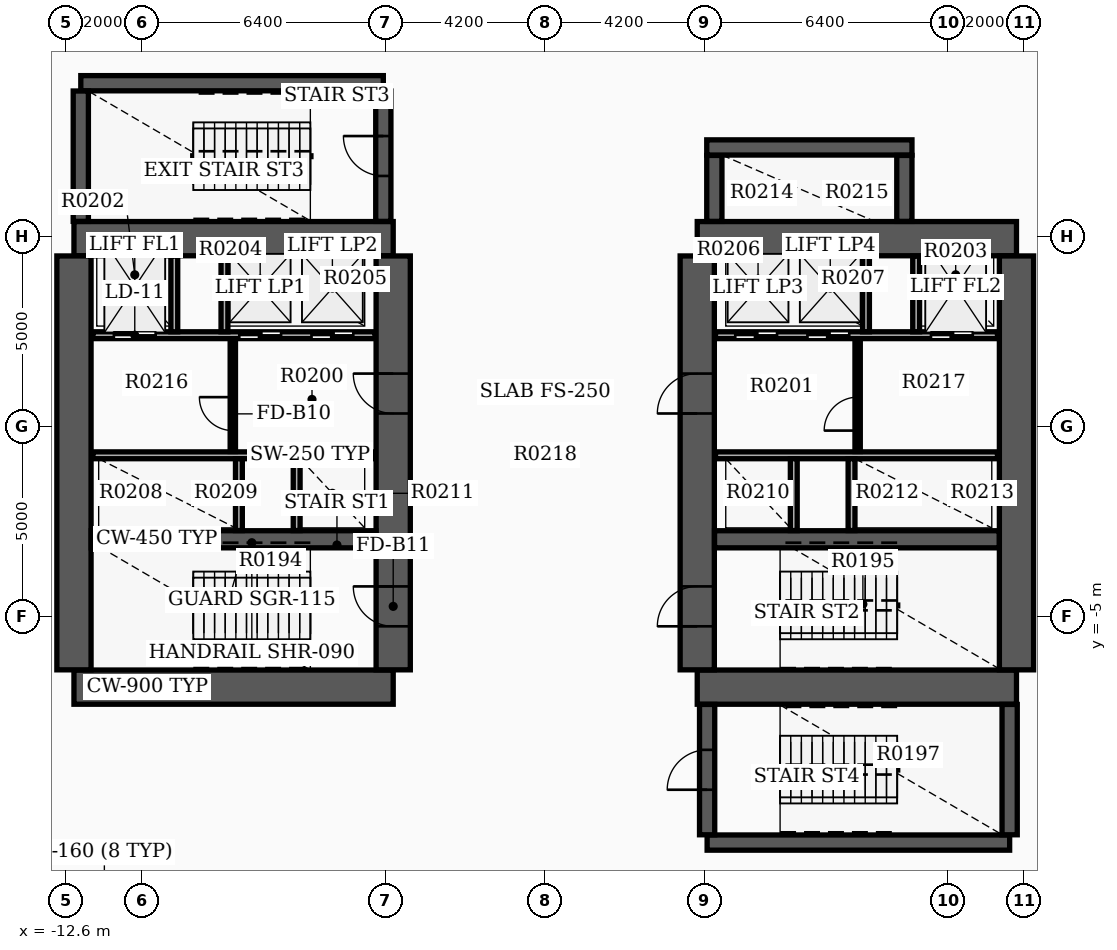
"""IFC4 building model, lengths in metres.
Left out: names, types, materials, properties, quantities, classifications, styles, units other than length and angle.
Written with IfcOpenShell. Run it as: python <this file> out.ifc"""

import sys

from ifc_helpers import new_model, si_unit, direction, frame, frame_2d, origin, place, context, subcontext, project, spatial, rectangle, extrude, element, fill, save


model = new_model("IFC4")
c1 = context("Model", 3, precision=1e-05, world=origin(), true_north=direction((0.0, 1.0)))
c2 = subcontext(c1, "Body", "Model", "MODEL_VIEW")
j1 = project(units=[si_unit("LENGTHUNIT", "METRE"), si_unit("PLANEANGLEUNIT", "RADIAN")], contexts=[c1])
p1 = place(None, origin())
s1 = spatial("IfcSite", under=j1, at=p1, CompositionType="ELEMENT")
p2 = place(p1, origin())
s2 = spatial("IfcBuilding", under=s1, at=p2, CompositionType="ELEMENT")
p3 = place(p2, frame((0.0, 0.0, 14.7)))
s3 = spatial("IfcBuildingStorey", under=s2, at=p3, CompositionType="ELEMENT", Elevation=14.7)
for number, where, z_axis, x_axis in (
    (1, (-12.4, -6.85, 0.0), (0.0, 0.0, 1.0), (1.0, 0.0, 0.0)),
    (2, (-12.4, 4.95, 0.0), (0.0, 0.0, 1.0), (1.0, 0.0, 0.0)),
):
    element("IfcWall", number, at=place(p3, frame(where, z_axis=z_axis, x_axis=x_axis)), inside=s3, PredefinedType="SHEAR", context=c2, shape_type="SweptSolid", body=[
        extrude(rectangle(XDim=8.4, YDim=0.9, at=frame_2d((4.2, 0.0))), origin(), (0.0, 0.0, 1.0), 4.25),
    ])
p4 = place(p3, frame((-12.4, -6.395, 0.0), z_axis=(0.0, 0.0, 1.0), x_axis=(0.0, 1.0, 0.0)))
e3 = element("IfcWall", 3, at=p4, inside=s3, PredefinedType="SHEAR", context=c2, shape_type="SweptSolid", body=[
    extrude(rectangle(XDim=10.89, YDim=0.9, at=frame_2d((5.445, 0.0))), origin(), (0.0, 0.0, 1.0), 4.25),
])
p5 = place(p3, frame((-4.0, -6.395, 0.0), z_axis=(0.0, 0.0, 1.0), x_axis=(0.0, 1.0, 0.0)))
e4 = element("IfcWall", 4, at=p5, inside=s3, PredefinedType="SHEAR", context=c2, shape_type="SweptSolid", body=[
    extrude(rectangle(XDim=10.89, YDim=0.9, at=frame_2d((5.445, 0.0))), origin(), (0.0, 0.0, 1.0), 4.25),
])
p6 = place(p5, frame((1.145, 0.0, 0.0)))
e5 = element("IfcOpeningElement", 5, at=p6, cuts=e4, PredefinedType="OPENING", context=c2, shape_type="SweptSolid", body=[
    extrude(rectangle(XDim=1.05, YDim=2.15, at=frame_2d((0.525, 1.075))), frame((0.0, 0.46, 0.0), z_axis=(0.0, -1.0, 0.0), x_axis=(1.0, 0.0, 0.0)), (0.0, 0.0, 1.0), 0.92),
])
p7 = place(p5, frame((6.745, 0.0, 0.0)))
e6 = element("IfcOpeningElement", 6, at=p7, cuts=e4, PredefinedType="OPENING", context=c2, shape_type="SweptSolid", body=[
    extrude(rectangle(XDim=1.05, YDim=2.15, at=frame_2d((0.525, 1.075))), frame((0.0, 0.46, 0.0), z_axis=(0.0, -1.0, 0.0), x_axis=(1.0, 0.0, 0.0)), (0.0, 0.0, 1.0), 0.92),
])
p8 = place(p3, frame((-11.945, -2.96, 0.0), z_axis=(0.0, 0.0, 1.0), x_axis=(1.0, 0.0, 0.0)))
e7 = element("IfcWall", 7, at=p8, inside=s3, PredefinedType="SHEAR", context=c2, shape_type="SweptSolid", body=[
    extrude(rectangle(XDim=7.49, YDim=0.45, at=frame_2d((3.745, 0.0))), origin(), (0.0, 0.0, 1.0), 4.25),
])
for number, where, z_axis, x_axis in (
    (8, (4.0, -6.85, 0.0), (0.0, 0.0, 1.0), (1.0, 0.0, 0.0)),
    (9, (4.0, 4.95, 0.0), (0.0, 0.0, 1.0), (1.0, 0.0, 0.0)),
):
    element("IfcWall", number, at=place(p3, frame(where, z_axis=z_axis, x_axis=x_axis)), inside=s3, PredefinedType="SHEAR", context=c2, shape_type="SweptSolid", body=[
        extrude(rectangle(XDim=8.4, YDim=0.9, at=frame_2d((4.2, 0.0))), origin(), (0.0, 0.0, 1.0), 4.25),
    ])
p9 = place(p3, frame((4.0, -6.395, 0.0), z_axis=(0.0, 0.0, 1.0), x_axis=(0.0, 1.0, 0.0)))
e10 = element("IfcWall", 10, at=p9, inside=s3, PredefinedType="SHEAR", context=c2, shape_type="SweptSolid", body=[
    extrude(rectangle(XDim=10.89, YDim=0.9, at=frame_2d((5.445, 0.0))), origin(), (0.0, 0.0, 1.0), 4.25),
])
p10 = place(p9, frame((1.145, 0.0, 0.0)))
e11 = element("IfcOpeningElement", 11, at=p10, cuts=e10, PredefinedType="OPENING", context=c2, shape_type="SweptSolid", body=[
    extrude(rectangle(XDim=1.05, YDim=2.15, at=frame_2d((0.525, 1.075))), frame((0.0, 0.46, 0.0), z_axis=(0.0, -1.0, 0.0), x_axis=(1.0, 0.0, 0.0)), (0.0, 0.0, 1.0), 0.92),
])
p11 = place(p9, frame((6.745, 0.0, 0.0)))
e12 = element("IfcOpeningElement", 12, at=p11, cuts=e10, PredefinedType="OPENING", context=c2, shape_type="SweptSolid", body=[
    extrude(rectangle(XDim=1.05, YDim=2.15, at=frame_2d((0.525, 1.075))), frame((0.0, 0.46, 0.0), z_axis=(0.0, -1.0, 0.0), x_axis=(1.0, 0.0, 0.0)), (0.0, 0.0, 1.0), 0.92),
])
p12 = place(p3, frame((12.4, -6.395, 0.0), z_axis=(0.0, 0.0, 1.0), x_axis=(0.0, 1.0, 0.0)))
e13 = element("IfcWall", 13, at=p12, inside=s3, PredefinedType="SHEAR", context=c2, shape_type="SweptSolid", body=[
    extrude(rectangle(XDim=10.89, YDim=0.9, at=frame_2d((5.445, 0.0))), origin(), (0.0, 0.0, 1.0), 4.25),
])
p13 = place(p3, frame((4.455, -2.96, 0.0), z_axis=(0.0, 0.0, 1.0), x_axis=(1.0, 0.0, 0.0)))
e14 = element("IfcWall", 14, at=p13, inside=s3, PredefinedType="SHEAR", context=c2, shape_type="SweptSolid", body=[
    extrude(rectangle(XDim=7.49, YDim=0.45, at=frame_2d((3.745, 0.0))), origin(), (0.0, 0.0, 1.0), 4.25),
])
p14 = place(p3, frame((-12.22, 9.04, 0.0), z_axis=(0.0, 0.0, 1.0), x_axis=(1.0, 0.0, 0.0)))
e15 = element("IfcWall", 15, at=p14, inside=s3, PredefinedType="SHEAR", context=c2, shape_type="SweptSolid", body=[
    extrude(rectangle(XDim=7.96, YDim=0.4, at=frame_2d((3.98, 0.0))), origin(), (0.0, 0.0, 1.0), 4.25),
])
p15 = place(p3, frame((-12.22, 5.405, 0.0), z_axis=(0.0, 0.0, 1.0), x_axis=(0.0, 1.0, 0.0)))
e16 = element("IfcWall", 16, at=p15, inside=s3, PredefinedType="SHEAR", context=c2, shape_type="SweptSolid", body=[
    extrude(rectangle(XDim=3.43, YDim=0.4, at=frame_2d((1.715, 0.0))), origin(), (0.0, 0.0, 1.0), 4.25),
])
p16 = place(p3, frame((-4.26, 5.405, 0.0), z_axis=(0.0, 0.0, 1.0), x_axis=(0.0, 1.0, 0.0)))
e17 = element("IfcWall", 17, at=p16, inside=s3, PredefinedType="SHEAR", context=c2, shape_type="SweptSolid", body=[
    extrude(rectangle(XDim=3.43, YDim=0.4, at=frame_2d((1.715, 0.0))), origin(), (0.0, 0.0, 1.0), 4.25),
])
p17 = place(p16, frame((1.195, 0.0, 0.0)))
e18 = element("IfcOpeningElement", 18, at=p17, cuts=e17, PredefinedType="OPENING", context=c2, shape_type="SweptSolid", body=[
    extrude(rectangle(XDim=1.05, YDim=2.15, at=frame_2d((0.525, 1.075))), frame((0.0, 0.21, 0.0), z_axis=(0.0, -1.0, 0.0), x_axis=(1.0, 0.0, 0.0)), (0.0, 0.0, 1.0), 0.42),
])
p18 = place(p3, frame((4.26, -10.94, 0.0), z_axis=(0.0, 0.0, 1.0), x_axis=(1.0, 0.0, 0.0)))
e19 = element("IfcWall", 19, at=p18, inside=s3, PredefinedType="SHEAR", context=c2, shape_type="SweptSolid", body=[
    extrude(rectangle(XDim=7.96, YDim=0.4, at=frame_2d((3.98, 0.0))), origin(), (0.0, 0.0, 1.0), 4.25),
])
p19 = place(p3, frame((4.26, -10.735, 0.0), z_axis=(0.0, 0.0, 1.0), x_axis=(0.0, 1.0, 0.0)))
e20 = element("IfcWall", 20, at=p19, inside=s3, PredefinedType="SHEAR", context=c2, shape_type="SweptSolid", body=[
    extrude(rectangle(XDim=3.43, YDim=0.4, at=frame_2d((1.715, 0.0))), origin(), (0.0, 0.0, 1.0), 4.25),
])
p20 = place(p19, frame((1.185, 0.0, 0.0)))
e21 = element("IfcOpeningElement", 21, at=p20, cuts=e20, PredefinedType="OPENING", context=c2, shape_type="SweptSolid", body=[
    extrude(rectangle(XDim=1.05, YDim=2.15, at=frame_2d((0.525, 1.075))), frame((0.0, 0.21, 0.0), z_axis=(0.0, -1.0, 0.0), x_axis=(1.0, 0.0, 0.0)), (0.0, 0.0, 1.0), 0.42),
])
p21 = place(p3, frame((12.22, -10.735, 0.0), z_axis=(0.0, 0.0, 1.0), x_axis=(0.0, 1.0, 0.0)))
e22 = element("IfcWall", 22, at=p21, inside=s3, PredefinedType="SHEAR", context=c2, shape_type="SweptSolid", body=[
    extrude(rectangle(XDim=3.43, YDim=0.4, at=frame_2d((1.715, 0.0))), origin(), (0.0, 0.0, 1.0), 4.25),
])
p22 = place(p3, frame((4.45, 5.405, 0.0), z_axis=(0.0, 0.0, 1.0), x_axis=(0.0, 1.0, 0.0)))
e23 = element("IfcWall", 23, at=p22, inside=s3, PredefinedType="SHEAR", context=c2, shape_type="SweptSolid", body=[
    extrude(rectangle(XDim=1.735, YDim=0.4, at=frame_2d((0.867, 0.0))), origin(), (0.0, 0.0, 1.0), 4.25),
])
p23 = place(p3, frame((4.25, 7.35, 0.0), z_axis=(0.0, 0.0, 1.0), x_axis=(1.0, 0.0, 0.0)))
e24 = element("IfcWall", 24, at=p23, inside=s3, PredefinedType="SHEAR", context=c2, shape_type="SweptSolid", body=[
    extrude(rectangle(XDim=5.4, YDim=0.4, at=frame_2d((2.7, 0.0))), origin(), (0.0, 0.0, 1.0), 4.25),
])
p24 = place(p3, frame((9.45, 5.405, 0.0), z_axis=(0.0, 0.0, 1.0), x_axis=(0.0, 1.0, 0.0)))
e25 = element("IfcWall", 25, at=p24, inside=s3, PredefinedType="SHEAR", context=c2, shape_type="SweptSolid", body=[
    extrude(rectangle(XDim=1.735, YDim=0.4, at=frame_2d((0.867, 0.0))), origin(), (0.0, 0.0, 1.0), 4.25),
])
p25 = place(p3, frame((-11.9, 2.41, 0.0), z_axis=(0.0, 0.0, 1.0), x_axis=(1.0, 0.0, 0.0)))
e26 = element("IfcWall", 26, at=p25, inside=s3, PredefinedType="SOLIDWALL", context=c2, shape_type="SweptSolid", body=[
    extrude(rectangle(XDim=7.42, YDim=0.18, at=frame_2d((3.71, 0.0))), origin(), (0.0, 0.0, 1.0), 3.32),
])
p26 = place(p25, frame((0.55, 0.0, 0.0)))
e27 = element("IfcOpeningElement", 27, at=p26, cuts=e26, PredefinedType="OPENING", context=c2, shape_type="SweptSolid", body=[
    extrude(rectangle(XDim=1.1, YDim=2.15, at=frame_2d((0.55, 1.075))), frame((0.0, 0.1, 0.0), z_axis=(0.0, -1.0, 0.0), x_axis=(1.0, 0.0, 0.0)), (0.0, 0.0, 1.0), 0.2),
])
p27 = place(p25, frame((3.85, 0.0, 0.0)))
e28 = element("IfcOpeningElement", 28, at=p27, cuts=e26, PredefinedType="OPENING", context=c2, shape_type="SweptSolid", body=[
    extrude(rectangle(XDim=1.1, YDim=2.15, at=frame_2d((0.55, 1.075))), frame((0.0, 0.1, 0.0), z_axis=(0.0, -1.0, 0.0), x_axis=(1.0, 0.0, 0.0)), (0.0, 0.0, 1.0), 0.2),
])
p28 = place(p25, frame((5.75, 0.0, 0.0)))
e29 = element("IfcOpeningElement", 29, at=p28, cuts=e26, PredefinedType="OPENING", context=c2, shape_type="SweptSolid", body=[
    extrude(rectangle(XDim=1.1, YDim=2.15, at=frame_2d((0.55, 1.075))), frame((0.0, 0.1, 0.0), z_axis=(0.0, -1.0, 0.0), x_axis=(1.0, 0.0, 0.0)), (0.0, 0.0, 1.0), 0.2),
])
p29 = place(p3, frame((4.48, 2.41, 0.0), z_axis=(0.0, 0.0, 1.0), x_axis=(1.0, 0.0, 0.0)))
e30 = element("IfcWall", 30, at=p29, inside=s3, PredefinedType="SOLIDWALL", context=c2, shape_type="SweptSolid", body=[
    extrude(rectangle(XDim=7.42, YDim=0.18, at=frame_2d((3.71, 0.0))), origin(), (0.0, 0.0, 1.0), 3.32),
])
p30 = place(p29, frame((5.67, 0.0, 0.0)))
e31 = element("IfcOpeningElement", 31, at=p30, cuts=e30, PredefinedType="OPENING", context=c2, shape_type="SweptSolid", body=[
    extrude(rectangle(XDim=1.1, YDim=2.15, at=frame_2d((0.55, 1.075))), frame((0.0, 0.1, 0.0), z_axis=(0.0, -1.0, 0.0), x_axis=(1.0, 0.0, 0.0)), (0.0, 0.0, 1.0), 0.2),
])
p31 = place(p29, frame((0.52, 0.0, 0.0)))
e32 = element("IfcOpeningElement", 32, at=p31, cuts=e30, PredefinedType="OPENING", context=c2, shape_type="SweptSolid", body=[
    extrude(rectangle(XDim=1.1, YDim=2.15, at=frame_2d((0.55, 1.075))), frame((0.0, 0.1, 0.0), z_axis=(0.0, -1.0, 0.0), x_axis=(1.0, 0.0, 0.0)), (0.0, 0.0, 1.0), 0.2),
])
p32 = place(p29, frame((2.42, 0.0, 0.0)))
e33 = element("IfcOpeningElement", 33, at=p32, cuts=e30, PredefinedType="OPENING", context=c2, shape_type="SweptSolid", body=[
    extrude(rectangle(XDim=1.1, YDim=2.15, at=frame_2d((0.55, 1.075))), frame((0.0, 0.1, 0.0), z_axis=(0.0, -1.0, 0.0), x_axis=(1.0, 0.0, 0.0)), (0.0, 0.0, 1.0), 0.2),
])
for number, where, z_axis, x_axis in (
    (34, (-11.9, -0.75, 0.0), (0.0, 0.0, 1.0), (1.0, 0.0, 0.0)),
    (35, (4.48, -0.75, 0.0), (0.0, 0.0, 1.0), (1.0, 0.0, 0.0)),
):
    element("IfcWall", number, at=place(p3, frame(where, z_axis=z_axis, x_axis=x_axis)), inside=s3, PredefinedType="SOLIDWALL", context=c2, shape_type="SweptSolid", body=[
        extrude(rectangle(XDim=7.42, YDim=0.18, at=frame_2d((3.71, 0.0))), origin(), (0.0, 0.0, 1.0), 3.32),
    ])
for number, where, z_axis, x_axis in (
    (36, (-9.76, 2.5, 0.0), (0.0, 0.0, 1.0), (0.0, 1.0, 0.0)),
    (37, (-8.44, 2.5, 0.0), (0.0, 0.0, 1.0), (0.0, 1.0, 0.0)),
    (38, (8.44, 2.5, 0.0), (0.0, 0.0, 1.0), (0.0, 1.0, 0.0)),
    (39, (9.76, 2.5, 0.0), (0.0, 0.0, 1.0), (0.0, 1.0, 0.0)),
):
    element("IfcWall", number, at=place(p3, frame(where, z_axis=z_axis, x_axis=x_axis)), inside=s3, PredefinedType="SOLIDWALL", context=c2, shape_type="SweptSolid", body=[
        extrude(rectangle(XDim=1.99, YDim=0.18, at=frame_2d((0.995, 0.0))), origin(), (0.0, 0.0, 1.0), 3.32),
    ])
for number, where, z_axis, x_axis in (
    (40, (-8.06, -2.73, 0.0), (0.0, 0.0, 1.0), (0.0, 1.0, 0.0)),
    (41, (-6.54, -2.73, 0.0), (0.0, 0.0, 1.0), (0.0, 1.0, 0.0)),
    (42, (6.54, -2.73, 0.0), (0.0, 0.0, 1.0), (0.0, 1.0, 0.0)),
    (43, (8.06, -2.73, 0.0), (0.0, 0.0, 1.0), (0.0, 1.0, 0.0)),
):
    element("IfcWall", number, at=place(p3, frame(where, z_axis=z_axis, x_axis=x_axis)), inside=s3, PredefinedType="SOLIDWALL", context=c2, shape_type="SweptSolid", body=[
        extrude(rectangle(XDim=1.89, YDim=0.18, at=frame_2d((0.945, 0.0))), origin(), (0.0, 0.0, 1.0), 3.32),
    ])
p33 = place(p3, frame((-8.22, -0.65, 0.0), z_axis=(0.0, 0.0, 1.0), x_axis=(0.0, 1.0, 0.0)))
e44 = element("IfcWall", 44, at=p33, inside=s3, PredefinedType="SOLIDWALL", context=c2, shape_type="SweptSolid", body=[
    extrude(rectangle(XDim=2.96, YDim=0.14, at=frame_2d((1.48, 0.0))), origin(), (0.0, 0.0, 1.0), 3.32),
])
p34 = place(p33, frame((0.55, 0.0, 0.0)))
e45 = element("IfcOpeningElement", 45, at=p34, cuts=e44, PredefinedType="OPENING", context=c2, shape_type="SweptSolid", body=[
    extrude(rectangle(XDim=0.88, YDim=2.1, at=frame_2d((0.44, 1.05))), frame((0.0, 0.08, 0.0), z_axis=(0.0, -1.0, 0.0), x_axis=(1.0, 0.0, 0.0)), (0.0, 0.0, 1.0), 0.16),
])
p35 = place(p3, frame((8.22, -0.65, 0.0), z_axis=(0.0, 0.0, 1.0), x_axis=(0.0, 1.0, 0.0)))
e46 = element("IfcWall", 46, at=p35, inside=s3, PredefinedType="SOLIDWALL", context=c2, shape_type="SweptSolid", body=[
    extrude(rectangle(XDim=2.96, YDim=0.14, at=frame_2d((1.48, 0.0))), origin(), (0.0, 0.0, 1.0), 3.32),
])
p36 = place(p35, frame((0.55, 0.0, 0.0)))
e47 = element("IfcOpeningElement", 47, at=p36, cuts=e46, PredefinedType="OPENING", context=c2, shape_type="SweptSolid", body=[
    extrude(rectangle(XDim=0.88, YDim=2.1, at=frame_2d((0.44, 1.05))), frame((0.0, 0.08, 0.0), z_axis=(0.0, -1.0, 0.0), x_axis=(1.0, 0.0, 0.0)), (0.0, 0.0, 1.0), 0.16),
])
p37 = place(p6, origin())
e48 = element("IfcDoor", 48, at=p37, inside=s3, OperationType="SINGLE_SWING_RIGHT", PredefinedType="DOOR", context=c2, shape_type="SweptSolid", body=[
    extrude(rectangle(XDim=1.05, YDim=2.15, at=frame_2d((0.525, 1.075))), frame((0.0, 0.025, 0.0), z_axis=(0.0, -1.0, 0.0), x_axis=(1.0, 0.0, 0.0)), (0.0, 0.0, 1.0), 0.05),
])
fill(e5, e48)
p38 = place(p10, origin())
e49 = element("IfcDoor", 49, at=p38, inside=s3, OperationType="SINGLE_SWING_LEFT", PredefinedType="DOOR", context=c2, shape_type="SweptSolid", body=[
    extrude(rectangle(XDim=1.05, YDim=2.15, at=frame_2d((0.525, 1.075))), frame((0.0, 0.025, 0.0), z_axis=(0.0, -1.0, 0.0), x_axis=(1.0, 0.0, 0.0)), (0.0, 0.0, 1.0), 0.05),
])
fill(e11, e49)
p39 = place(p7, origin())
e50 = element("IfcDoor", 50, at=p39, inside=s3, OperationType="SINGLE_SWING_RIGHT", PredefinedType="DOOR", context=c2, shape_type="SweptSolid", body=[
    extrude(rectangle(XDim=1.05, YDim=2.15, at=frame_2d((0.525, 1.075))), frame((0.0, 0.025, 0.0), z_axis=(0.0, -1.0, 0.0), x_axis=(1.0, 0.0, 0.0)), (0.0, 0.0, 1.0), 0.05),
])
fill(e6, e50)
p40 = place(p11, origin())
e51 = element("IfcDoor", 51, at=p40, inside=s3, OperationType="SINGLE_SWING_LEFT", PredefinedType="DOOR", context=c2, shape_type="SweptSolid", body=[
    extrude(rectangle(XDim=1.05, YDim=2.15, at=frame_2d((0.525, 1.075))), frame((0.0, 0.025, 0.0), z_axis=(0.0, -1.0, 0.0), x_axis=(1.0, 0.0, 0.0)), (0.0, 0.0, 1.0), 0.05),
])
fill(e12, e51)
p41 = place(p17, origin())
e52 = element("IfcDoor", 52, at=p41, inside=s3, OperationType="SINGLE_SWING_RIGHT", PredefinedType="DOOR", context=c2, shape_type="SweptSolid", body=[
    extrude(rectangle(XDim=1.05, YDim=2.15, at=frame_2d((0.525, 1.075))), frame((0.0, 0.025, 0.0), z_axis=(0.0, -1.0, 0.0), x_axis=(1.0, 0.0, 0.0)), (0.0, 0.0, 1.0), 0.05),
])
fill(e18, e52)
p42 = place(p20, origin())
e53 = element("IfcDoor", 53, at=p42, inside=s3, OperationType="SINGLE_SWING_LEFT", PredefinedType="DOOR", context=c2, shape_type="SweptSolid", body=[
    extrude(rectangle(XDim=1.05, YDim=2.15, at=frame_2d((0.525, 1.075))), frame((0.0, 0.025, 0.0), z_axis=(0.0, -1.0, 0.0), x_axis=(1.0, 0.0, 0.0)), (0.0, 0.0, 1.0), 0.05),
])
fill(e21, e53)
p43 = place(p26, origin())
e54 = element("IfcDoor", 54, at=p43, inside=s3, OperationType="DOUBLE_DOOR_SLIDING", PredefinedType="DOOR", context=c2, shape_type="SweptSolid", body=[
    extrude(rectangle(XDim=1.1, YDim=2.15, at=frame_2d((0.55, 1.075))), frame((0.0, 0.025, 0.0), z_axis=(0.0, -1.0, 0.0), x_axis=(1.0, 0.0, 0.0)), (0.0, 0.0, 1.0), 0.05),
])
fill(e27, e54)
p44 = place(p30, origin())
e55 = element("IfcDoor", 55, at=p44, inside=s3, OperationType="DOUBLE_DOOR_SLIDING", PredefinedType="DOOR", context=c2, shape_type="SweptSolid", body=[
    extrude(rectangle(XDim=1.1, YDim=2.15, at=frame_2d((0.55, 1.075))), frame((0.0, 0.025, 0.0), z_axis=(0.0, -1.0, 0.0), x_axis=(1.0, 0.0, 0.0)), (0.0, 0.0, 1.0), 0.05),
])
fill(e31, e55)
p45 = place(p27, origin())
e56 = element("IfcDoor", 56, at=p45, inside=s3, OperationType="DOUBLE_DOOR_SLIDING", PredefinedType="DOOR", context=c2, shape_type="SweptSolid", body=[
    extrude(rectangle(XDim=1.1, YDim=2.15, at=frame_2d((0.55, 1.075))), frame((0.0, 0.025, 0.0), z_axis=(0.0, -1.0, 0.0), x_axis=(1.0, 0.0, 0.0)), (0.0, 0.0, 1.0), 0.05),
])
fill(e28, e56)
p46 = place(p28, origin())
e57 = element("IfcDoor", 57, at=p46, inside=s3, OperationType="DOUBLE_DOOR_SLIDING", PredefinedType="DOOR", context=c2, shape_type="SweptSolid", body=[
    extrude(rectangle(XDim=1.1, YDim=2.15, at=frame_2d((0.55, 1.075))), frame((0.0, 0.025, 0.0), z_axis=(0.0, -1.0, 0.0), x_axis=(1.0, 0.0, 0.0)), (0.0, 0.0, 1.0), 0.05),
])
fill(e29, e57)
p47 = place(p31, origin())
e58 = element("IfcDoor", 58, at=p47, inside=s3, OperationType="DOUBLE_DOOR_SLIDING", PredefinedType="DOOR", context=c2, shape_type="SweptSolid", body=[
    extrude(rectangle(XDim=1.1, YDim=2.15, at=frame_2d((0.55, 1.075))), frame((0.0, 0.025, 0.0), z_axis=(0.0, -1.0, 0.0), x_axis=(1.0, 0.0, 0.0)), (0.0, 0.0, 1.0), 0.05),
])
fill(e32, e58)
p48 = place(p32, origin())
e59 = element("IfcDoor", 59, at=p48, inside=s3, OperationType="DOUBLE_DOOR_SLIDING", PredefinedType="DOOR", context=c2, shape_type="SweptSolid", body=[
    extrude(rectangle(XDim=1.1, YDim=2.15, at=frame_2d((0.55, 1.075))), frame((0.0, 0.025, 0.0), z_axis=(0.0, -1.0, 0.0), x_axis=(1.0, 0.0, 0.0)), (0.0, 0.0, 1.0), 0.05),
])
fill(e33, e59)
p49 = place(p34, origin())
e60 = element("IfcDoor", 60, at=p49, inside=s3, OperationType="SINGLE_SWING_RIGHT", PredefinedType="DOOR", context=c2, shape_type="SweptSolid", body=[
    extrude(rectangle(XDim=0.88, YDim=2.1, at=frame_2d((0.44, 1.05))), frame((0.0, 0.025, 0.0), z_axis=(0.0, -1.0, 0.0), x_axis=(1.0, 0.0, 0.0)), (0.0, 0.0, 1.0), 0.05),
])
fill(e45, e60)
p50 = place(p36, origin())
e61 = element("IfcDoor", 61, at=p50, inside=s3, OperationType="SINGLE_SWING_LEFT", PredefinedType="DOOR", context=c2, shape_type="SweptSolid", body=[
    extrude(rectangle(XDim=0.88, YDim=2.1, at=frame_2d((0.44, 1.05))), frame((0.0, 0.025, 0.0), z_axis=(0.0, -1.0, 0.0), x_axis=(1.0, 0.0, 0.0)), (0.0, 0.0, 1.0), 0.05),
])
fill(e47, e61)
save(model, sys.argv[1])
